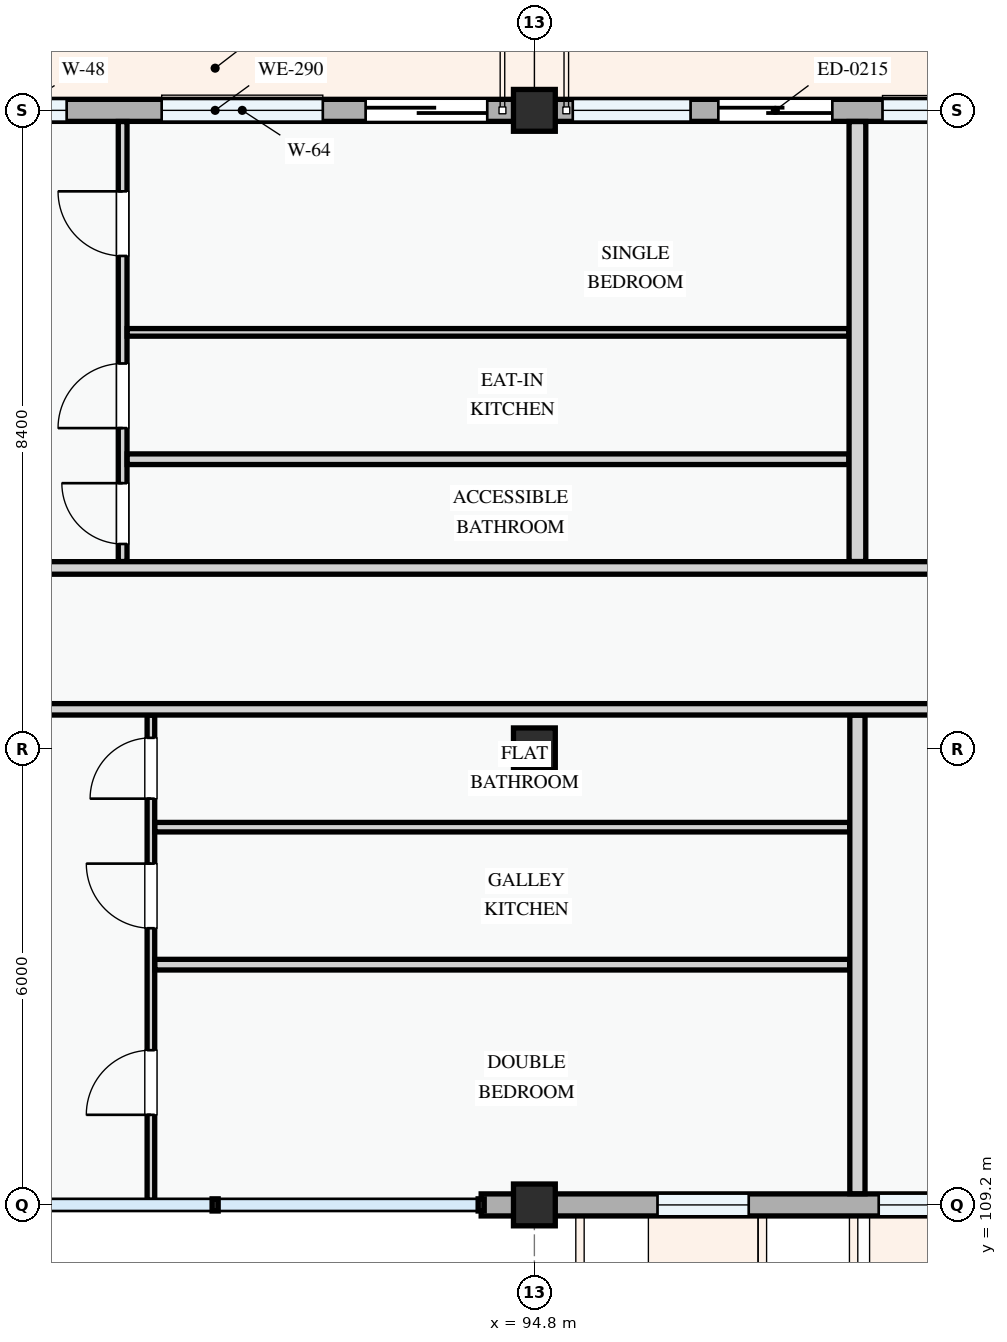
"""IFC4 building model, lengths in metres.
Left out: names, types, materials, properties, quantities, classifications, styles, units other than length and angle.
Written with IfcOpenShell. Run it as: python <this file> out.ifc"""

import sys

from ifc_helpers import new_model, si_unit, direction, frame, frame_2d, origin, origin_2d, place, context, subcontext, project, spatial, rectangle, extrude, element, fill, save


model = new_model("IFC4")
c1 = context("Model", 3, precision=1e-05, world=origin(), true_north=direction((0.0, 1.0)))
c2 = subcontext(c1, "Body", "Model", "MODEL_VIEW")
j1 = project(units=[si_unit("LENGTHUNIT", "METRE"), si_unit("PLANEANGLEUNIT", "RADIAN")], contexts=[c1])
p1 = place(None, origin())
s1 = spatial("IfcSite", under=j1, at=p1, CompositionType="ELEMENT")
p2 = place(p1, origin())
s2 = spatial("IfcBuilding", under=s1, at=p2, CompositionType="ELEMENT")
p3 = place(p2, frame((0.0, 0.0, 24.6)))
s3 = spatial("IfcBuildingStorey", under=s2, at=p3, CompositionType="ELEMENT", Elevation=24.6)
for number, where, z_axis, x_axis in (
    (1, (94.8, 109.2, 0.0), (0.0, 0.0, 1.0), (1.0, 0.0, 0.0)),
    (2, (94.8, 115.2, 0.0), (0.0, 0.0, 1.0), (1.0, 0.0, 0.0)),
    (3, (94.8, 123.6, 0.0), (0.0, 0.0, 1.0), (1.0, 0.0, 0.0)),
):
    element("IfcColumn", number, at=place(p3, frame(where, z_axis=z_axis, x_axis=x_axis)), inside=s3, PredefinedType="COLUMN", context=c2, shape_type="SweptSolid", body=[
        extrude(rectangle(XDim=0.55, YDim=0.55, at=origin_2d()), origin(), (0.0, 0.0, 1.0), 3.3),
    ])
p4 = place(p3, frame((100.8, 123.6, 0.0), z_axis=(0.0, 0.0, 1.0), x_axis=(-1.0, 0.0, 0.0)))
e4 = element("IfcWall", 4, at=p4, inside=s3, PredefinedType="STANDARD", context=c2, shape_type="SweptSolid", body=[
    extrude(rectangle(XDim=6.0, YDim=0.29, at=frame_2d((3.0, 0.0))), origin(), (0.0, 0.0, 1.0), 2.475),
])
p5 = place(p4, frame((2.08, 0.0, 0.0)))
e5 = element("IfcOpeningElement", 5, at=p5, cuts=e4, PredefinedType="OPENING", context=c2, shape_type="SweptSolid", body=[
    extrude(rectangle(XDim=1.5, YDim=2.2, at=frame_2d((0.75, 1.1))), frame((0.0, 0.155, 0.0), z_axis=(0.0, -1.0, 0.0), x_axis=(1.0, 0.0, 0.0)), (0.0, 0.0, 1.0), 0.31),
])
p6 = place(p4, frame((0.52, 0.0, 0.78)))
e6 = element("IfcOpeningElement", 6, at=p6, cuts=e4, PredefinedType="OPENING", context=c2, shape_type="SweptSolid", body=[
    extrude(rectangle(XDim=0.9, YDim=1.2, at=frame_2d((0.45, 0.6))), frame((0.0, 0.155, 0.0), z_axis=(0.0, -1.0, 0.0), x_axis=(1.0, 0.0, 0.0)), (0.0, 0.0, 1.0), 0.31),
])
p7 = place(p4, frame((3.945, 0.0, 0.78)))
e7 = element("IfcOpeningElement", 7, at=p7, cuts=e4, PredefinedType="OPENING", context=c2, shape_type="SweptSolid", body=[
    extrude(rectangle(XDim=1.55, YDim=1.4, at=frame_2d((0.775, 0.7))), frame((0.0, 0.155, 0.0), z_axis=(0.0, -1.0, 0.0), x_axis=(1.0, 0.0, 0.0)), (0.0, 0.0, 1.0), 0.31),
])
p8 = place(p3, frame((94.8, 123.6, 0.0), z_axis=(0.0, 0.0, 1.0), x_axis=(-1.0, 0.0, 0.0)))
e8 = element("IfcWall", 8, at=p8, inside=s3, PredefinedType="STANDARD", context=c2, shape_type="SweptSolid", body=[
    extrude(rectangle(XDim=8.4, YDim=0.29, at=frame_2d((4.2, 0.0))), origin(), (0.0, 0.0, 1.0), 2.375),
])
p9 = place(p8, frame((0.62, 0.0, 0.0)))
e9 = element("IfcOpeningElement", 9, at=p9, cuts=e8, PredefinedType="OPENING", context=c2, shape_type="SweptSolid", body=[
    extrude(rectangle(XDim=1.6, YDim=2.2, at=frame_2d((0.8, 1.1))), frame((0.0, 0.155, 0.0), z_axis=(0.0, -1.0, 0.0), x_axis=(1.0, 0.0, 0.0)), (0.0, 0.0, 1.0), 0.31),
])
p10 = place(p8, frame((2.783, 0.0, 0.78)))
e10 = element("IfcOpeningElement", 10, at=p10, cuts=e8, PredefinedType="OPENING", context=c2, shape_type="SweptSolid", body=[
    extrude(rectangle(XDim=2.12, YDim=1.44, at=frame_2d((1.06, 0.72))), frame((0.0, 0.155, 0.0), z_axis=(0.0, -1.0, 0.0), x_axis=(1.0, 0.0, 0.0)), (0.0, 0.0, 1.0), 0.31),
])
p11 = place(p8, frame((6.153, 0.0, 0.78)))
e11 = element("IfcOpeningElement", 11, at=p11, cuts=e8, PredefinedType="OPENING", context=c2, shape_type="SweptSolid", body=[
    extrude(rectangle(XDim=1.32, YDim=1.35, at=frame_2d((0.66, 0.675))), frame((0.0, 0.155, 0.0), z_axis=(0.0, -1.0, 0.0), x_axis=(1.0, 0.0, 0.0)), (0.0, 0.0, 1.0), 0.31),
])
p12 = place(p3, frame((94.1, 109.2, 0.0), z_axis=(0.0, 0.0, 1.0), x_axis=(1.0, 0.0, 0.0)))
e12 = element("IfcWall", 12, at=p12, inside=s3, PredefinedType="STANDARD", context=c2, shape_type="SweptSolid", body=[
    extrude(rectangle(XDim=0.7, YDim=0.29, at=frame_2d((0.35, 0.0))), origin(), (0.0, 0.0, 1.0), 2.375),
])
p13 = place(p3, frame((94.8, 109.2, 0.0), z_axis=(0.0, 0.0, 1.0), x_axis=(1.0, 0.0, 0.0)))
e13 = element("IfcWall", 13, at=p13, inside=s3, PredefinedType="STANDARD", context=c2, shape_type="SweptSolid", body=[
    extrude(rectangle(XDim=6.0, YDim=0.29, at=frame_2d((3.0, 0.0))), origin(), (0.0, 0.0, 1.0), 2.475),
])
p14 = place(p13, frame((1.62, 0.0, 0.78)))
e14 = element("IfcOpeningElement", 14, at=p14, cuts=e13, PredefinedType="OPENING", context=c2, shape_type="SweptSolid", body=[
    extrude(rectangle(XDim=1.2, YDim=1.35, at=frame_2d((0.6, 0.675))), frame((0.0, 0.155, 0.0), z_axis=(0.0, -1.0, 0.0), x_axis=(1.0, 0.0, 0.0)), (0.0, 0.0, 1.0), 0.31),
])
p15 = place(p13, frame((4.53, 0.0, 0.78)))
e15 = element("IfcOpeningElement", 15, at=p15, cuts=e13, PredefinedType="OPENING", context=c2, shape_type="SweptSolid", body=[
    extrude(rectangle(XDim=1.0, YDim=1.25, at=frame_2d((0.5, 0.625))), frame((0.0, 0.155, 0.0), z_axis=(0.0, -1.0, 0.0), x_axis=(1.0, 0.0, 0.0)), (0.0, 0.0, 1.0), 0.31),
])
p16 = place(p3, frame((89.755, 109.26, 0.0), z_axis=(0.0, 0.0, 1.0), x_axis=(0.0, 1.0, 0.0)))
e16 = element("IfcWall", 16, at=p16, inside=s3, PredefinedType="PARTITIONING", context=c2, shape_type="SweptSolid", body=[
    extrude(rectangle(XDim=6.383, YDim=0.1, at=frame_2d((3.191, 0.0))), origin(), (0.0, 0.0, 1.0), 3.0),
])
p17 = place(p16, frame((1.125, 0.0, 0.0)))
e17 = element("IfcOpeningElement", 17, at=p17, cuts=e16, PredefinedType="OPENING", context=c2, shape_type="SweptSolid", body=[
    extrude(rectangle(XDim=0.85, YDim=2.1, at=frame_2d((0.425, 1.05))), frame((0.0, 0.06, 0.0), z_axis=(0.0, -1.0, 0.0), x_axis=(1.0, 0.0, 0.0)), (0.0, 0.0, 1.0), 0.12),
])
p18 = place(p16, frame((3.58, 0.0, 0.0)))
e18 = element("IfcOpeningElement", 18, at=p18, cuts=e16, PredefinedType="OPENING", context=c2, shape_type="SweptSolid", body=[
    extrude(rectangle(XDim=0.85, YDim=2.1, at=frame_2d((0.425, 1.05))), frame((0.0, 0.06, 0.0), z_axis=(0.0, -1.0, 0.0), x_axis=(1.0, 0.0, 0.0)), (0.0, 0.0, 1.0), 0.12),
])
p19 = place(p16, frame((5.285, 0.0, 0.0)))
e19 = element("IfcOpeningElement", 19, at=p19, cuts=e16, PredefinedType="OPENING", context=c2, shape_type="SweptSolid", body=[
    extrude(rectangle(XDim=0.8, YDim=2.1, at=frame_2d((0.4, 1.05))), frame((0.0, 0.06, 0.0), z_axis=(0.0, -1.0, 0.0), x_axis=(1.0, 0.0, 0.0)), (0.0, 0.0, 1.0), 0.12),
])
p20 = place(p3, frame((89.807, 112.361, 0.0), z_axis=(0.0, 0.0, 1.0), x_axis=(1.0, 0.0, 0.0)))
e20 = element("IfcWall", 20, at=p20, inside=s3, PredefinedType="PARTITIONING", context=c2, shape_type="SweptSolid", body=[
    extrude(rectangle(XDim=9.141, YDim=0.14, at=frame_2d((4.571, 0.0))), origin(), (0.0, 0.0, 1.0), 3.0),
])
p21 = place(p3, frame((89.807, 114.17, 0.0), z_axis=(0.0, 0.0, 1.0), x_axis=(1.0, 0.0, 0.0)))
e21 = element("IfcWall", 21, at=p21, inside=s3, PredefinedType="PARTITIONING", context=c2, shape_type="SweptSolid", body=[
    extrude(rectangle(XDim=9.141, YDim=0.125, at=frame_2d((4.571, 0.0))), origin(), (0.0, 0.0, 1.0), 3.0),
])
p22 = place(p3, frame((89.383, 117.665, 0.0), z_axis=(0.0, 0.0, 1.0), x_axis=(0.0, 1.0, 0.0)))
e22 = element("IfcWall", 22, at=p22, inside=s3, PredefinedType="PARTITIONING", context=c2, shape_type="SweptSolid", body=[
    extrude(rectangle(XDim=5.788, YDim=0.115, at=frame_2d((2.894, 0.0))), origin(), (0.0, 0.0, 1.0), 3.0),
])
p23 = place(p22, frame((0.231, 0.0, 0.0)))
e23 = element("IfcOpeningElement", 23, at=p23, cuts=e22, PredefinedType="OPENING", context=c2, shape_type="SweptSolid", body=[
    extrude(rectangle(XDim=0.8, YDim=2.1, at=frame_2d((0.4, 1.05))), frame((0.0, 0.067, 0.0), z_axis=(0.0, -1.0, 0.0), x_axis=(1.0, 0.0, 0.0)), (0.0, 0.0, 1.0), 0.135),
])
p24 = place(p22, frame((1.755, 0.0, 0.0)))
e24 = element("IfcOpeningElement", 24, at=p24, cuts=e22, PredefinedType="OPENING", context=c2, shape_type="SweptSolid", body=[
    extrude(rectangle(XDim=0.85, YDim=2.1, at=frame_2d((0.425, 1.05))), frame((0.0, 0.067, 0.0), z_axis=(0.0, -1.0, 0.0), x_axis=(1.0, 0.0, 0.0)), (0.0, 0.0, 1.0), 0.135),
])
p25 = place(p22, frame((4.02, 0.0, 0.0)))
e25 = element("IfcOpeningElement", 25, at=p25, cuts=e22, PredefinedType="OPENING", context=c2, shape_type="SweptSolid", body=[
    extrude(rectangle(XDim=0.85, YDim=2.1, at=frame_2d((0.425, 1.05))), frame((0.0, 0.067, 0.0), z_axis=(0.0, -1.0, 0.0), x_axis=(1.0, 0.0, 0.0)), (0.0, 0.0, 1.0), 0.135),
])
p26 = place(p3, frame((89.443, 120.679, 0.0), z_axis=(0.0, 0.0, 1.0), x_axis=(1.0, 0.0, 0.0)))
e26 = element("IfcWall", 26, at=p26, inside=s3, PredefinedType="PARTITIONING", context=c2, shape_type="SweptSolid", body=[
    extrude(rectangle(XDim=9.495, YDim=0.1, at=frame_2d((4.748, 0.0))), origin(), (0.0, 0.0, 1.0), 3.0),
])
p27 = place(p3, frame((89.443, 119.01, 0.0), z_axis=(0.0, 0.0, 1.0), x_axis=(1.0, 0.0, 0.0)))
e27 = element("IfcWall", 27, at=p27, inside=s3, PredefinedType="PARTITIONING", context=c2, shape_type="SweptSolid", body=[
    extrude(rectangle(XDim=9.495, YDim=0.14, at=frame_2d((4.748, 0.0))), origin(), (0.0, 0.0, 1.0), 3.0),
])
p28 = place(p3, frame((99.05, 109.347, 0.0), z_axis=(0.0, 0.0, 1.0), x_axis=(0.0, 1.0, 0.0)))
e28 = element("IfcWall", 28, at=p28, inside=s3, PredefinedType="PARTITIONING", context=c2, shape_type="SweptSolid", body=[
    extrude(rectangle(XDim=6.296, YDim=0.2, at=frame_2d((3.148, 0.0))), origin(), (0.0, 0.0, 1.0), 3.0),
])
p29 = place(p3, frame((99.05, 117.665, 0.0), z_axis=(0.0, 0.0, 1.0), x_axis=(0.0, 1.0, 0.0)))
e29 = element("IfcWall", 29, at=p29, inside=s3, PredefinedType="PARTITIONING", context=c2, shape_type="SweptSolid", body=[
    extrude(rectangle(XDim=5.788, YDim=0.22, at=frame_2d((2.894, 0.0))), origin(), (0.0, 0.0, 1.0), 3.0),
])
p30 = place(p3, frame((80.547, 115.72, 0.0), z_axis=(0.0, 0.0, 1.0), x_axis=(1.0, 0.0, 0.0)))
e30 = element("IfcWall", 30, at=p30, inside=s3, PredefinedType="PARTITIONING", context=c2, shape_type="SweptSolid", body=[
    extrude(rectangle(XDim=69.503, YDim=0.15, at=frame_2d((34.751, 0.0))), origin(), (0.0, 0.0, 1.0), 3.0),
])
p31 = place(p30, frame((2.367, 0.0, 0.0)))
e31 = element("IfcOpeningElement", 31, at=p31, cuts=e30, PredefinedType="OPENING", context=c2, shape_type="SweptSolid", body=[
    extrude(rectangle(XDim=0.92, YDim=2.1, at=frame_2d((0.46, 1.05))), frame((0.0, 0.085, 0.0), z_axis=(0.0, -1.0, 0.0), x_axis=(1.0, 0.0, 0.0)), (0.0, 0.0, 1.0), 0.17),
])
p32 = place(p30, frame((23.968, 0.0, 0.0)))
e32 = element("IfcOpeningElement", 32, at=p32, cuts=e30, PredefinedType="OPENING", context=c2, shape_type="SweptSolid", body=[
    extrude(rectangle(XDim=0.92, YDim=2.1, at=frame_2d((0.46, 1.05))), frame((0.0, 0.085, 0.0), z_axis=(0.0, -1.0, 0.0), x_axis=(1.0, 0.0, 0.0)), (0.0, 0.0, 1.0), 0.17),
])
p33 = place(p30, frame((39.133, 0.0, 0.0)))
e33 = element("IfcOpeningElement", 33, at=p33, cuts=e30, PredefinedType="OPENING", context=c2, shape_type="SweptSolid", body=[
    extrude(rectangle(XDim=0.92, YDim=2.1, at=frame_2d((0.46, 1.05))), frame((0.0, 0.085, 0.0), z_axis=(0.0, -1.0, 0.0), x_axis=(1.0, 0.0, 0.0)), (0.0, 0.0, 1.0), 0.17),
])
p34 = place(p30, frame((59.909, 0.0, 0.0)))
e34 = element("IfcOpeningElement", 34, at=p34, cuts=e30, PredefinedType="OPENING", context=c2, shape_type="SweptSolid", body=[
    extrude(rectangle(XDim=0.96, YDim=2.12, at=frame_2d((0.48, 1.06))), frame((0.0, 0.085, 0.0), z_axis=(0.0, -1.0, 0.0), x_axis=(1.0, 0.0, 0.0)), (0.0, 0.0, 1.0), 0.17),
])
p35 = place(p3, frame((80.547, 117.58, 0.0), z_axis=(0.0, 0.0, 1.0), x_axis=(1.0, 0.0, 0.0)))
e35 = element("IfcWall", 35, at=p35, inside=s3, PredefinedType="PARTITIONING", context=c2, shape_type="SweptSolid", body=[
    extrude(rectangle(XDim=71.993, YDim=0.165, at=frame_2d((35.997, 0.0))), origin(), (0.0, 0.0, 1.0), 3.0),
])
p36 = place(p35, frame((2.262, 0.0, 0.0)))
e36 = element("IfcOpeningElement", 36, at=p36, cuts=e35, PredefinedType="OPENING", context=c2, shape_type="SweptSolid", body=[
    extrude(rectangle(XDim=0.92, YDim=2.1, at=frame_2d((0.46, 1.05))), frame((0.0, 0.093, 0.0), z_axis=(0.0, -1.0, 0.0), x_axis=(1.0, 0.0, 0.0)), (0.0, 0.0, 1.0), 0.185),
])
p37 = place(p35, frame((23.945, 0.0, 0.0)))
e37 = element("IfcOpeningElement", 37, at=p37, cuts=e35, PredefinedType="OPENING", context=c2, shape_type="SweptSolid", body=[
    extrude(rectangle(XDim=0.92, YDim=2.1, at=frame_2d((0.46, 1.05))), frame((0.0, 0.093, 0.0), z_axis=(0.0, -1.0, 0.0), x_axis=(1.0, 0.0, 0.0)), (0.0, 0.0, 1.0), 0.185),
])
p38 = place(p35, frame((39.133, 0.0, 0.0)))
e38 = element("IfcOpeningElement", 38, at=p38, cuts=e35, PredefinedType="OPENING", context=c2, shape_type="SweptSolid", body=[
    extrude(rectangle(XDim=0.92, YDim=2.1, at=frame_2d((0.46, 1.05))), frame((0.0, 0.093, 0.0), z_axis=(0.0, -1.0, 0.0), x_axis=(1.0, 0.0, 0.0)), (0.0, 0.0, 1.0), 0.185),
])
p39 = place(p35, frame((59.929, 0.0, 0.0)))
e39 = element("IfcOpeningElement", 39, at=p39, cuts=e35, PredefinedType="OPENING", context=c2, shape_type="SweptSolid", body=[
    extrude(rectangle(XDim=0.92, YDim=2.1, at=frame_2d((0.46, 1.05))), frame((0.0, 0.093, 0.0), z_axis=(0.0, -1.0, 0.0), x_axis=(1.0, 0.0, 0.0)), (0.0, 0.0, 1.0), 0.185),
])
p40 = place(p5, frame((1.5, 0.0, 0.0), z_axis=(0.0, 0.0, 1.0), x_axis=(-1.0, 0.0, 0.0)))
e40 = element("IfcDoor", 40, at=p40, inside=s3, OperationType="SLIDING_TO_RIGHT", PredefinedType="DOOR", context=c2, shape_type="SweptSolid", body=[
    extrude(rectangle(XDim=1.5, YDim=2.2, at=frame_2d((0.75, 1.1))), frame((0.0, 0.025, 0.0), z_axis=(0.0, -1.0, 0.0), x_axis=(1.0, 0.0, 0.0)), (0.0, 0.0, 1.0), 0.05),
])
fill(e5, e40)
p41 = place(p6, origin())
e41 = element("IfcWindow", 41, at=p41, inside=s3, PartitioningType="SINGLE_PANEL", PredefinedType="WINDOW", context=c2, shape_type="SweptSolid", body=[
    extrude(rectangle(XDim=0.9, YDim=1.2, at=frame_2d((0.45, 0.6))), frame((0.0, 0.03, 0.0), z_axis=(0.0, -1.0, 0.0), x_axis=(1.0, 0.0, 0.0)), (0.0, 0.0, 1.0), 0.06),
])
fill(e6, e41)
p42 = place(p7, origin())
e42 = element("IfcWindow", 42, at=p42, inside=s3, PartitioningType="SINGLE_PANEL", PredefinedType="WINDOW", context=c2, shape_type="SweptSolid", body=[
    extrude(rectangle(XDim=1.55, YDim=1.4, at=frame_2d((0.775, 0.7))), frame((0.0, 0.03, 0.0), z_axis=(0.0, -1.0, 0.0), x_axis=(1.0, 0.0, 0.0)), (0.0, 0.0, 1.0), 0.06),
])
fill(e7, e42)
p43 = place(p9, frame((1.6, 0.0, 0.0), z_axis=(0.0, 0.0, 1.0), x_axis=(-1.0, 0.0, 0.0)))
e43 = element("IfcDoor", 43, at=p43, inside=s3, OperationType="SLIDING_TO_LEFT", PredefinedType="DOOR", context=c2, shape_type="SweptSolid", body=[
    extrude(rectangle(XDim=1.6, YDim=2.2, at=frame_2d((0.8, 1.1))), frame((0.0, 0.025, 0.0), z_axis=(0.0, -1.0, 0.0), x_axis=(1.0, 0.0, 0.0)), (0.0, 0.0, 1.0), 0.05),
])
fill(e9, e43)
p44 = place(p10, origin())
e44 = element("IfcWindow", 44, at=p44, inside=s3, PartitioningType="DOUBLE_PANEL_VERTICAL", PredefinedType="WINDOW", context=c2, shape_type="SweptSolid", body=[
    extrude(rectangle(XDim=2.12, YDim=1.44, at=frame_2d((1.06, 0.72))), frame((0.0, 0.03, 0.0), z_axis=(0.0, -1.0, 0.0), x_axis=(1.0, 0.0, 0.0)), (0.0, 0.0, 1.0), 0.06),
])
fill(e10, e44)
p45 = place(p11, origin())
e45 = element("IfcWindow", 45, at=p45, inside=s3, PartitioningType="SINGLE_PANEL", PredefinedType="WINDOW", context=c2, shape_type="SweptSolid", body=[
    extrude(rectangle(XDim=1.32, YDim=1.35, at=frame_2d((0.66, 0.675))), frame((0.0, 0.03, 0.0), z_axis=(0.0, -1.0, 0.0), x_axis=(1.0, 0.0, 0.0)), (0.0, 0.0, 1.0), 0.06),
])
fill(e11, e45)
p46 = place(p14, origin())
e46 = element("IfcWindow", 46, at=p46, inside=s3, PartitioningType="SINGLE_PANEL", PredefinedType="WINDOW", context=c2, shape_type="SweptSolid", body=[
    extrude(rectangle(XDim=1.2, YDim=1.35, at=frame_2d((0.6, 0.675))), frame((0.0, 0.03, 0.0), z_axis=(0.0, -1.0, 0.0), x_axis=(1.0, 0.0, 0.0)), (0.0, 0.0, 1.0), 0.06),
])
fill(e14, e46)
p47 = place(p15, origin())
e47 = element("IfcWindow", 47, at=p47, inside=s3, PartitioningType="SINGLE_PANEL", PredefinedType="WINDOW", context=c2, shape_type="SweptSolid", body=[
    extrude(rectangle(XDim=1.0, YDim=1.25, at=frame_2d((0.5, 0.625))), frame((0.0, 0.03, 0.0), z_axis=(0.0, -1.0, 0.0), x_axis=(1.0, 0.0, 0.0)), (0.0, 0.0, 1.0), 0.06),
])
fill(e15, e47)
p48 = place(p17, origin())
e48 = element("IfcDoor", 48, at=p48, inside=s3, OperationType="SINGLE_SWING_LEFT", PredefinedType="DOOR", context=c2, shape_type="SweptSolid", body=[
    extrude(rectangle(XDim=0.85, YDim=2.1, at=frame_2d((0.425, 1.05))), frame((0.0, 0.025, 0.0), z_axis=(0.0, -1.0, 0.0), x_axis=(1.0, 0.0, 0.0)), (0.0, 0.0, 1.0), 0.05),
])
fill(e17, e48)
p49 = place(p18, origin())
e49 = element("IfcDoor", 49, at=p49, inside=s3, OperationType="SINGLE_SWING_RIGHT", PredefinedType="DOOR", context=c2, shape_type="SweptSolid", body=[
    extrude(rectangle(XDim=0.85, YDim=2.1, at=frame_2d((0.425, 1.05))), frame((0.0, 0.025, 0.0), z_axis=(0.0, -1.0, 0.0), x_axis=(1.0, 0.0, 0.0)), (0.0, 0.0, 1.0), 0.05),
])
fill(e18, e49)
p50 = place(p19, origin())
e50 = element("IfcDoor", 50, at=p50, inside=s3, OperationType="SINGLE_SWING_LEFT", PredefinedType="DOOR", context=c2, shape_type="SweptSolid", body=[
    extrude(rectangle(XDim=0.8, YDim=2.1, at=frame_2d((0.4, 1.05))), frame((0.0, 0.025, 0.0), z_axis=(0.0, -1.0, 0.0), x_axis=(1.0, 0.0, 0.0)), (0.0, 0.0, 1.0), 0.05),
])
fill(e19, e50)
p51 = place(p23, origin())
e51 = element("IfcDoor", 51, at=p51, inside=s3, OperationType="SINGLE_SWING_RIGHT", PredefinedType="DOOR", context=c2, shape_type="SweptSolid", body=[
    extrude(rectangle(XDim=0.8, YDim=2.1, at=frame_2d((0.4, 1.05))), frame((0.0, 0.025, 0.0), z_axis=(0.0, -1.0, 0.0), x_axis=(1.0, 0.0, 0.0)), (0.0, 0.0, 1.0), 0.05),
])
fill(e23, e51)
p52 = place(p24, origin())
e52 = element("IfcDoor", 52, at=p52, inside=s3, OperationType="SINGLE_SWING_LEFT", PredefinedType="DOOR", context=c2, shape_type="SweptSolid", body=[
    extrude(rectangle(XDim=0.85, YDim=2.1, at=frame_2d((0.425, 1.05))), frame((0.0, 0.025, 0.0), z_axis=(0.0, -1.0, 0.0), x_axis=(1.0, 0.0, 0.0)), (0.0, 0.0, 1.0), 0.05),
])
fill(e24, e52)
p53 = place(p25, origin())
e53 = element("IfcDoor", 53, at=p53, inside=s3, OperationType="SINGLE_SWING_RIGHT", PredefinedType="DOOR", context=c2, shape_type="SweptSolid", body=[
    extrude(rectangle(XDim=0.85, YDim=2.1, at=frame_2d((0.425, 1.05))), frame((0.0, 0.025, 0.0), z_axis=(0.0, -1.0, 0.0), x_axis=(1.0, 0.0, 0.0)), (0.0, 0.0, 1.0), 0.05),
])
fill(e25, e53)
save(model, sys.argv[1])
